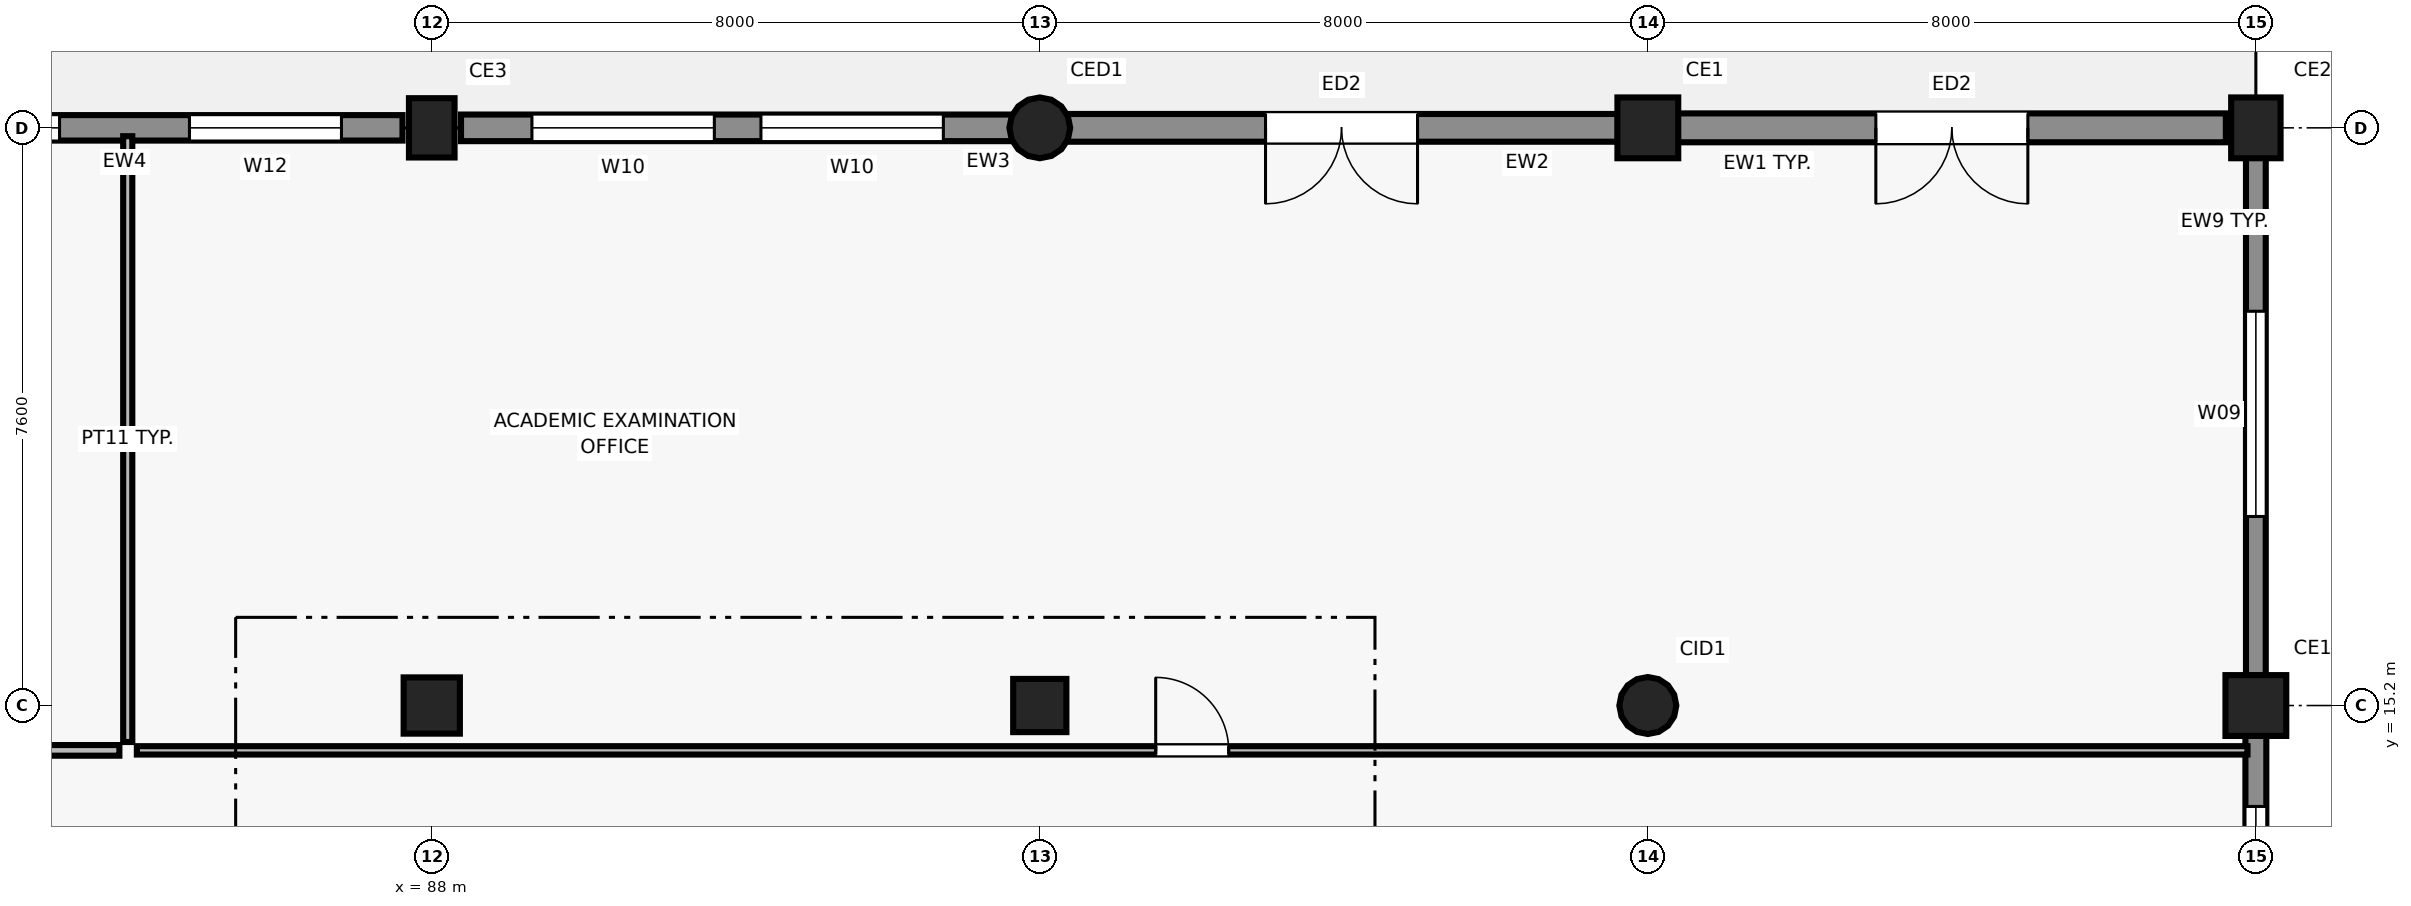
"""IFC4 building model, lengths in metres.
Left out: names, types, materials, properties, quantities, classifications, styles, units other than length and angle.
Written with IfcOpenShell. Run it as: python <this file> out.ifc"""

import sys

from ifc_helpers import new_model, si_unit, direction, frame, frame_2d, origin, origin_2d, place, context, subcontext, project, spatial, rectangle, circle, extrude, element, fill, save


model = new_model("IFC4")
c1 = context("Model", 3, precision=1e-05, world=origin(), true_north=direction((0.0, 1.0)))
c2 = subcontext(c1, "Body", "Model", "MODEL_VIEW")
j1 = project(units=[si_unit("LENGTHUNIT", "METRE"), si_unit("PLANEANGLEUNIT", "RADIAN")], contexts=[c1])
p1 = place(None, origin())
s1 = spatial("IfcSite", under=j1, at=p1, CompositionType="ELEMENT")
p2 = place(p1, origin())
s2 = spatial("IfcBuilding", under=s1, at=p2, CompositionType="ELEMENT")
p3 = place(p2, origin())
s3 = spatial("IfcBuildingStorey", under=s2, at=p3, CompositionType="ELEMENT", Elevation=0.0)
p4 = place(p3, frame((88.0, 15.2, 0.0), z_axis=(0.0, 0.0, 1.0), x_axis=(1.0, 0.0, 0.0)))
e1 = element("IfcColumn", 1, at=p4, inside=s3, PredefinedType="COLUMN", context=c2, shape_type="SweptSolid", body=[
    extrude(rectangle(XDim=0.74, YDim=0.74, at=origin_2d()), origin(), (0.0, 0.0, 1.0), 4.5),
])
p5 = place(p3, frame((88.0, 22.8, 0.0), z_axis=(0.0, 0.0, 1.0), x_axis=(1.0, 0.0, 0.0)))
e2 = element("IfcColumn", 2, at=p5, inside=s3, PredefinedType="COLUMN", context=c2, shape_type="SweptSolid", body=[
    extrude(rectangle(XDim=0.78, YDim=0.6, at=origin_2d()), origin(), (0.0, 0.0, 1.0), 4.5),
])
p6 = place(p3, frame((96.0, 15.2, 0.0), z_axis=(0.0, 0.0, 1.0), x_axis=(1.0, 0.0, 0.0)))
e3 = element("IfcColumn", 3, at=p6, inside=s3, PredefinedType="COLUMN", context=c2, shape_type="SweptSolid", body=[
    extrude(rectangle(XDim=0.7, YDim=0.7, at=origin_2d()), origin(), (0.0, 0.0, 1.0), 4.5),
])
p7 = place(p3, frame((96.0, 22.8, 0.0), z_axis=(0.0, 0.0, 1.0), x_axis=(1.0, 0.0, 0.0)))
e4 = element("IfcColumn", 4, at=p7, inside=s3, PredefinedType="COLUMN", context=c2, shape_type="SweptSolid", body=[
    extrude(circle(Radius=0.4, at=origin_2d()), origin(), (0.0, 0.0, 1.0), 4.5),
])
p8 = place(p3, frame((104.0, 15.2, 0.0), z_axis=(0.0, 0.0, 1.0), x_axis=(1.0, 0.0, 0.0)))
e5 = element("IfcColumn", 5, at=p8, inside=s3, PredefinedType="COLUMN", context=c2, shape_type="SweptSolid", body=[
    extrude(circle(Radius=0.375, at=origin_2d()), origin(), (0.0, 0.0, 1.0), 4.5),
])
for number, where, z_axis, x_axis in (
    (6, (104.0, 22.8, 0.0), (0.0, 0.0, 1.0), (1.0, 0.0, 0.0)),
    (7, (112.0, 15.2, 0.0), (0.0, 0.0, 1.0), (1.0, 0.0, 0.0)),
):
    element("IfcColumn", number, at=place(p3, frame(where, z_axis=z_axis, x_axis=x_axis)), inside=s3, PredefinedType="COLUMN", context=c2, shape_type="SweptSolid", body=[
        extrude(rectangle(XDim=0.8, YDim=0.8, at=origin_2d()), origin(), (0.0, 0.0, 1.0), 4.5),
    ])
p9 = place(p3, frame((112.0, 22.8, 0.0), z_axis=(0.0, 0.0, 1.0), x_axis=(1.0, 0.0, 0.0)))
e8 = element("IfcColumn", 8, at=p9, inside=s3, PredefinedType="COLUMN", context=c2, shape_type="SweptSolid", body=[
    extrude(rectangle(XDim=0.8, YDim=0.65, at=origin_2d()), origin(), (0.0, 0.0, 1.0), 4.5),
])
p10 = place(p3, frame((112.0, 7.936, 0.0), z_axis=(0.0, 0.0, 1.0), x_axis=(0.0, 1.0, 0.0)))
e9 = element("IfcWall", 9, at=p10, inside=s3, PredefinedType="SOLIDWALL", context=c2, shape_type="SweptSolid", body=[
    extrude(rectangle(XDim=6.869, YDim=0.275, at=frame_2d((3.435, 0.0))), origin(), (0.0, 0.0, 1.0), 3.76),
])
p11 = place(p10, frame((1.202, 0.0, 0.9)))
e10 = element("IfcOpeningElement", 10, at=p11, cuts=e9, PredefinedType="OPENING", context=c2, shape_type="SweptSolid", body=[
    extrude(rectangle(XDim=1.4, YDim=1.8, at=frame_2d((0.7, 0.9))), frame((0.0, 0.147, 0.0), z_axis=(0.0, -1.0, 0.0), x_axis=(1.0, 0.0, 0.0)), (0.0, 0.0, 1.0), 0.295),
])
p12 = place(p10, frame((4.736, 0.0, 0.9)))
e11 = element("IfcOpeningElement", 11, at=p12, cuts=e9, PredefinedType="OPENING", context=c2, shape_type="SweptSolid", body=[
    extrude(rectangle(XDim=1.2, YDim=1.8, at=frame_2d((0.6, 0.9))), frame((0.0, 0.147, 0.0), z_axis=(0.0, -1.0, 0.0), x_axis=(1.0, 0.0, 0.0)), (0.0, 0.0, 1.0), 0.295),
])
p13 = place(p3, frame((112.0, 15.595, 0.0), z_axis=(0.0, 0.0, 1.0), x_axis=(0.0, 1.0, 0.0)))
e12 = element("IfcWall", 12, at=p13, inside=s3, PredefinedType="SOLIDWALL", context=c2, shape_type="SweptSolid", body=[
    extrude(rectangle(XDim=6.885, YDim=0.26, at=frame_2d((3.442, 0.0))), origin(), (0.0, 0.0, 1.0), 3.78),
])
p14 = place(p13, frame((2.092, 0.0, 0.9)))
e13 = element("IfcOpeningElement", 13, at=p14, cuts=e12, PredefinedType="OPENING", context=c2, shape_type="SweptSolid", body=[
    extrude(rectangle(XDim=2.7, YDim=1.5, at=frame_2d((1.35, 0.75))), frame((0.0, 0.14, 0.0), z_axis=(0.0, -1.0, 0.0), x_axis=(1.0, 0.0, 0.0)), (0.0, 0.0, 1.0), 0.28),
])
p15 = place(p3, frame((111.605, 22.8, 0.0), z_axis=(0.0, 0.0, 1.0), x_axis=(-1.0, 0.0, 0.0)))
e14 = element("IfcWall", 14, at=p15, inside=s3, PredefinedType="SOLIDWALL", context=c2, shape_type="SweptSolid", body=[
    extrude(rectangle(XDim=7.21, YDim=0.38, at=frame_2d((3.605, 0.0))), origin(), (0.0, 0.0, 1.0), 3.67),
])
p16 = place(p15, frame((2.605, 0.0, 0.0)))
e15 = element("IfcOpeningElement", 15, at=p16, cuts=e14, PredefinedType="OPENING", context=c2, shape_type="SweptSolid", body=[
    extrude(rectangle(XDim=2.0, YDim=2.4, at=frame_2d((1.0, 1.2))), frame((0.0, 0.2, 0.0), z_axis=(0.0, -1.0, 0.0), x_axis=(1.0, 0.0, 0.0)), (0.0, 0.0, 1.0), 0.4),
])
p17 = place(p3, frame((103.605, 22.8, 0.0), z_axis=(0.0, 0.0, 1.0), x_axis=(-1.0, 0.0, 0.0)))
e16 = element("IfcWall", 16, at=p17, inside=s3, PredefinedType="SOLIDWALL", context=c2, shape_type="SweptSolid", body=[
    extrude(rectangle(XDim=7.269, YDim=0.365, at=frame_2d((3.635, 0.0))), origin(), (0.0, 0.0, 1.0), 3.54),
])
p18 = place(p17, frame((2.635, 0.0, 0.0)))
e17 = element("IfcOpeningElement", 17, at=p18, cuts=e16, PredefinedType="OPENING", context=c2, shape_type="SweptSolid", body=[
    extrude(rectangle(XDim=2.0, YDim=2.4, at=frame_2d((1.0, 1.2))), frame((0.0, 0.192, 0.0), z_axis=(0.0, -1.0, 0.0), x_axis=(1.0, 0.0, 0.0)), (0.0, 0.0, 1.0), 0.385),
])
p19 = place(p3, frame((95.664, 22.8, 0.0), z_axis=(0.0, 0.0, 1.0), x_axis=(-1.0, 0.0, 0.0)))
e18 = element("IfcWall", 18, at=p19, inside=s3, PredefinedType="SOLIDWALL", context=c2, shape_type="SweptSolid", body=[
    extrude(rectangle(XDim=7.279, YDim=0.35, at=frame_2d((3.64, 0.0))), origin(), (0.0, 0.0, 1.0), 3.57),
])
p20 = place(p19, frame((0.933, 0.0, 0.9)))
e19 = element("IfcOpeningElement", 19, at=p20, cuts=e18, PredefinedType="OPENING", context=c2, shape_type="SweptSolid", body=[
    extrude(rectangle(XDim=2.4, YDim=1.5, at=frame_2d((1.2, 0.75))), frame((0.0, 0.185, 0.0), z_axis=(0.0, -1.0, 0.0), x_axis=(1.0, 0.0, 0.0)), (0.0, 0.0, 1.0), 0.37),
])
p21 = place(p19, frame((3.946, 0.0, 0.9)))
e20 = element("IfcOpeningElement", 20, at=p21, cuts=e18, PredefinedType="OPENING", context=c2, shape_type="SweptSolid", body=[
    extrude(rectangle(XDim=2.4, YDim=1.5, at=frame_2d((1.2, 0.75))), frame((0.0, 0.185, 0.0), z_axis=(0.0, -1.0, 0.0), x_axis=(1.0, 0.0, 0.0)), (0.0, 0.0, 1.0), 0.37),
])
p22 = place(p3, frame((87.615, 22.8, 0.0), z_axis=(0.0, 0.0, 1.0), x_axis=(-1.0, 0.0, 0.0)))
e21 = element("IfcWall", 21, at=p22, inside=s3, PredefinedType="SOLIDWALL", context=c2, shape_type="SweptSolid", body=[
    extrude(rectangle(XDim=7.22, YDim=0.335, at=frame_2d((3.61, 0.0))), origin(), (0.0, 0.0, 1.0), 3.54),
])
p23 = place(p22, frame((0.803, 0.0, 0.9)))
e22 = element("IfcOpeningElement", 22, at=p23, cuts=e21, PredefinedType="OPENING", context=c2, shape_type="SweptSolid", body=[
    extrude(rectangle(XDim=2.0, YDim=1.5, at=frame_2d((1.0, 0.75))), frame((0.0, 0.177, 0.0), z_axis=(0.0, -1.0, 0.0), x_axis=(1.0, 0.0, 0.0)), (0.0, 0.0, 1.0), 0.355),
])
p24 = place(p22, frame((4.512, 0.0, 0.9)))
e23 = element("IfcOpeningElement", 23, at=p24, cuts=e21, PredefinedType="OPENING", context=c2, shape_type="SweptSolid", body=[
    extrude(rectangle(XDim=1.8, YDim=1.5, at=frame_2d((0.9, 0.75))), frame((0.0, 0.177, 0.0), z_axis=(0.0, -1.0, 0.0), x_axis=(1.0, 0.0, 0.0)), (0.0, 0.0, 1.0), 0.355),
])
p25 = place(p3, frame((56.12, 14.61, 0.0), z_axis=(0.0, 0.0, 1.0), x_axis=(1.0, 0.0, 0.0)))
e24 = element("IfcWall", 24, at=p25, inside=s3, PredefinedType="PARTITIONING", context=c2, shape_type="SweptSolid", body=[
    extrude(rectangle(XDim=27.77, YDim=0.14, at=frame_2d((13.885, 0.0))), origin(), (0.0, 0.0, 1.0), 4.2),
])
p26 = place(p25, frame((13.385, 0.0, 0.0)))
e25 = element("IfcOpeningElement", 25, at=p26, cuts=e24, PredefinedType="OPENING", context=c2, shape_type="SweptSolid", body=[
    extrude(rectangle(XDim=1.0, YDim=2.15, at=frame_2d((0.5, 1.075))), frame((0.0, 0.08, 0.0), z_axis=(0.0, -1.0, 0.0), x_axis=(1.0, 0.0, 0.0)), (0.0, 0.0, 1.0), 0.16),
])
p27 = place(p3, frame((84.0, 14.72, 0.0), z_axis=(0.0, 0.0, 1.0), x_axis=(0.0, 1.0, 0.0)))
e26 = element("IfcWall", 26, at=p27, inside=s3, PredefinedType="PARTITIONING", context=c2, shape_type="SweptSolid", body=[
    extrude(rectangle(XDim=7.97, YDim=0.12, at=frame_2d((3.985, 0.0))), origin(), (0.0, 0.0, 1.0), 4.2),
])
p28 = place(p3, frame((84.12, 14.61, 0.0), z_axis=(0.0, 0.0, 1.0), x_axis=(1.0, 0.0, 0.0)))
e27 = element("IfcWall", 27, at=p28, inside=s3, PredefinedType="PARTITIONING", context=c2, shape_type="SweptSolid", body=[
    extrude(rectangle(XDim=27.77, YDim=0.11, at=frame_2d((13.885, 0.0))), origin(), (0.0, 0.0, 1.0), 4.2),
])
p29 = place(p28, frame((13.405, 0.0, 0.0)))
e28 = element("IfcOpeningElement", 28, at=p29, cuts=e27, PredefinedType="OPENING", context=c2, shape_type="SweptSolid", body=[
    extrude(rectangle(XDim=0.96, YDim=2.15, at=frame_2d((0.48, 1.075))), frame((0.0, 0.065, 0.0), z_axis=(0.0, -1.0, 0.0), x_axis=(1.0, 0.0, 0.0)), (0.0, 0.0, 1.0), 0.13),
])
p30 = place(p12, origin())
e29 = element("IfcWindow", 29, at=p30, inside=s3, PartitioningType="SINGLE_PANEL", PredefinedType="WINDOW", context=c2, shape_type="SweptSolid", body=[
    extrude(rectangle(XDim=1.2, YDim=1.8, at=frame_2d((0.6, 0.9))), frame((0.0, 0.03, 0.0), z_axis=(0.0, -1.0, 0.0), x_axis=(1.0, 0.0, 0.0)), (0.0, 0.0, 1.0), 0.06),
])
fill(e11, e29)
p31 = place(p14, origin())
e30 = element("IfcWindow", 30, at=p31, inside=s3, PartitioningType="SINGLE_PANEL", PredefinedType="WINDOW", context=c2, shape_type="SweptSolid", body=[
    extrude(rectangle(XDim=2.7, YDim=1.5, at=frame_2d((1.35, 0.75))), frame((0.0, 0.03, 0.0), z_axis=(0.0, -1.0, 0.0), x_axis=(1.0, 0.0, 0.0)), (0.0, 0.0, 1.0), 0.06),
])
fill(e13, e30)
p32 = place(p16, frame((2.0, 0.0, 0.0), z_axis=(0.0, 0.0, 1.0), x_axis=(-1.0, 0.0, 0.0)))
e31 = element("IfcDoor", 31, at=p32, inside=s3, OperationType="DOUBLE_DOOR_SINGLE_SWING", PredefinedType="DOOR", context=c2, shape_type="SweptSolid", body=[
    extrude(rectangle(XDim=2.0, YDim=2.4, at=frame_2d((1.0, 1.2))), frame((0.0, 0.025, 0.0), z_axis=(0.0, -1.0, 0.0), x_axis=(1.0, 0.0, 0.0)), (0.0, 0.0, 1.0), 0.05),
])
fill(e15, e31)
p33 = place(p18, frame((2.0, 0.0, 0.0), z_axis=(0.0, 0.0, 1.0), x_axis=(-1.0, 0.0, 0.0)))
e32 = element("IfcDoor", 32, at=p33, inside=s3, OperationType="DOUBLE_DOOR_SINGLE_SWING", PredefinedType="DOOR", context=c2, shape_type="SweptSolid", body=[
    extrude(rectangle(XDim=2.0, YDim=2.4, at=frame_2d((1.0, 1.2))), frame((0.0, 0.025, 0.0), z_axis=(0.0, -1.0, 0.0), x_axis=(1.0, 0.0, 0.0)), (0.0, 0.0, 1.0), 0.05),
])
fill(e17, e32)
p34 = place(p20, origin())
e33 = element("IfcWindow", 33, at=p34, inside=s3, PartitioningType="SINGLE_PANEL", PredefinedType="WINDOW", context=c2, shape_type="SweptSolid", body=[
    extrude(rectangle(XDim=2.4, YDim=1.5, at=frame_2d((1.2, 0.75))), frame((0.0, 0.03, 0.0), z_axis=(0.0, -1.0, 0.0), x_axis=(1.0, 0.0, 0.0)), (0.0, 0.0, 1.0), 0.06),
])
fill(e19, e33)
p35 = place(p21, origin())
e34 = element("IfcWindow", 34, at=p35, inside=s3, PartitioningType="SINGLE_PANEL", PredefinedType="WINDOW", context=c2, shape_type="SweptSolid", body=[
    extrude(rectangle(XDim=2.4, YDim=1.5, at=frame_2d((1.2, 0.75))), frame((0.0, 0.03, 0.0), z_axis=(0.0, -1.0, 0.0), x_axis=(1.0, 0.0, 0.0)), (0.0, 0.0, 1.0), 0.06),
])
fill(e20, e34)
p36 = place(p23, origin())
e35 = element("IfcWindow", 35, at=p36, inside=s3, PartitioningType="SINGLE_PANEL", PredefinedType="WINDOW", context=c2, shape_type="SweptSolid", body=[
    extrude(rectangle(XDim=2.0, YDim=1.5, at=frame_2d((1.0, 0.75))), frame((0.0, 0.03, 0.0), z_axis=(0.0, -1.0, 0.0), x_axis=(1.0, 0.0, 0.0)), (0.0, 0.0, 1.0), 0.06),
])
fill(e22, e35)
p37 = place(p24, origin())
e36 = element("IfcWindow", 36, at=p37, inside=s3, PartitioningType="SINGLE_PANEL", PredefinedType="WINDOW", context=c2, shape_type="SweptSolid", body=[
    extrude(rectangle(XDim=1.8, YDim=1.5, at=frame_2d((0.9, 0.75))), frame((0.0, 0.03, 0.0), z_axis=(0.0, -1.0, 0.0), x_axis=(1.0, 0.0, 0.0)), (0.0, 0.0, 1.0), 0.06),
])
fill(e23, e36)
p38 = place(p29, origin())
e37 = element("IfcDoor", 37, at=p38, inside=s3, OperationType="SINGLE_SWING_LEFT", PredefinedType="DOOR", context=c2, shape_type="SweptSolid", body=[
    extrude(rectangle(XDim=0.96, YDim=2.15, at=frame_2d((0.48, 1.075))), frame((0.0, 0.025, 0.0), z_axis=(0.0, -1.0, 0.0), x_axis=(1.0, 0.0, 0.0)), (0.0, 0.0, 1.0), 0.05),
])
fill(e28, e37)
save(model, sys.argv[1])
